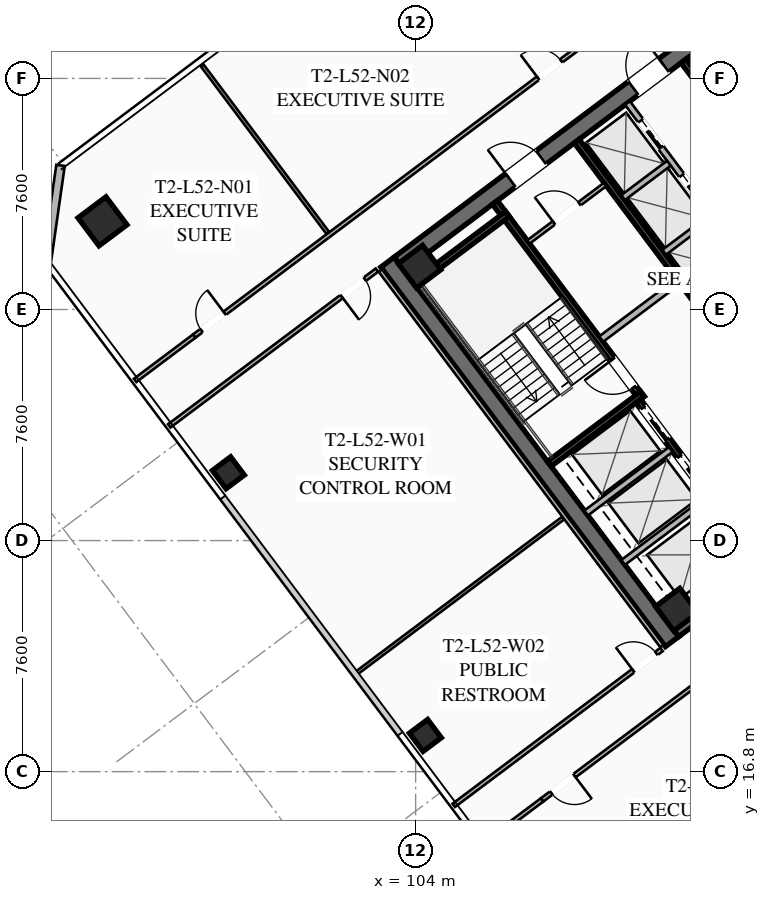
"""IFC4 building model, lengths in metres.
Left out: names, types, materials, properties, quantities, classifications, styles, units other than length and angle.
Written with IfcOpenShell. Run it as: python <this file> out.ifc"""

import sys

from ifc_helpers import new_model, si_unit, direction, frame, frame_2d, origin, origin_2d, place, context, subcontext, project, spatial, rectangle, hollow_rectangle, extrude, element, fill, save


model = new_model("IFC4")
c1 = context("Model", 3, precision=1e-05, world=origin(), true_north=direction((0.0, 1.0)))
c2 = subcontext(c1, "Body", "Model", "MODEL_VIEW")
j1 = project(units=[si_unit("LENGTHUNIT", "METRE"), si_unit("PLANEANGLEUNIT", "RADIAN")], contexts=[c1])
p1 = place(None, origin())
s1 = spatial("IfcSite", under=j1, at=p1, CompositionType="ELEMENT")
p2 = place(p1, origin())
s2 = spatial("IfcBuilding", under=s1, at=p2, CompositionType="ELEMENT")
p3 = place(p2, frame((0.0, 0.0, 192.5)))
s3 = spatial("IfcBuildingStorey", under=s2, at=p3, CompositionType="ELEMENT", Elevation=192.5)
p4 = place(p3, frame((112.436, 21.077, 0.0), z_axis=(0.0, 0.0, 1.0), x_axis=(-0.600005007985, 0.799996243986, 0.0)))
e1 = element("IfcWall", 1, at=p4, inside=s3, PredefinedType="SHEAR", context=c2, shape_type="SweptSolid", body=[
    extrude(rectangle(XDim=15.6, YDim=0.55, at=frame_2d((7.8, 0.0))), origin(), (0.0, 0.0, 1.0), 3.55),
])
p5 = place(p3, frame((124.539, 30.498, 0.0), z_axis=(0.0, 0.0, 1.0), x_axis=(-0.799998054672, -0.600002593761, 0.0)))
e2 = element("IfcWall", 2, at=p5, inside=s3, PredefinedType="SHEAR", context=c2, shape_type="SweptSolid", body=[
    extrude(rectangle(XDim=15.06, YDim=0.55, at=frame_2d((7.53, 0.0))), origin(), (0.0, 0.0, 1.0), 3.55),
])
p6 = place(p5, frame((9.23, 0.0, 0.0)))
e3 = element("IfcOpeningElement", 3, at=p6, cuts=e2, PredefinedType="OPENING", context=c2, shape_type="SweptSolid", body=[
    extrude(rectangle(XDim=1.25, YDim=2.25, at=frame_2d((0.625, 1.125))), frame((0.0, 0.285, 0.0), z_axis=(0.0, -1.0, 0.0), x_axis=(1.0, 0.0, 0.0)), (0.0, 0.0, 1.0), 0.57),
])
p7 = place(p5, frame((4.18, 0.0, 0.0)))
e4 = element("IfcOpeningElement", 4, at=p7, cuts=e2, PredefinedType="OPENING", context=c2, shape_type="SweptSolid", body=[
    extrude(rectangle(XDim=1.25, YDim=2.25, at=frame_2d((0.625, 1.125))), frame((0.0, 0.285, 0.0), z_axis=(0.0, -1.0, 0.0), x_axis=(1.0, 0.0, 0.0)), (0.0, 0.0, 1.0), 0.57),
])
p8 = place(p3, frame((103.461, 33.502, 0.0), z_axis=(0.0, 0.0, 1.0), x_axis=(0.799998054672, 0.600002593761, 0.0)))
e5 = element("IfcWall", 5, at=p8, inside=s3, PredefinedType="SHEAR", context=c2, shape_type="SweptSolid", body=[
    extrude(rectangle(XDim=15.06, YDim=0.55, at=frame_2d((7.53, 0.0))), origin(), (0.0, 0.0, 1.0), 3.55),
])
p9 = place(p8, frame((4.58, 0.0, 0.0)))
e6 = element("IfcOpeningElement", 6, at=p9, cuts=e5, PredefinedType="OPENING", context=c2, shape_type="SweptSolid", body=[
    extrude(rectangle(XDim=1.25, YDim=2.25, at=frame_2d((0.625, 1.125))), frame((0.0, 0.285, 0.0), z_axis=(0.0, -1.0, 0.0), x_axis=(1.0, 0.0, 0.0)), (0.0, 0.0, 1.0), 0.57),
])
p10 = place(p8, frame((9.63, 0.0, 0.0)))
e7 = element("IfcOpeningElement", 7, at=p10, cuts=e5, PredefinedType="OPENING", context=c2, shape_type="SweptSolid", body=[
    extrude(rectangle(XDim=1.25, YDim=2.25, at=frame_2d((0.625, 1.125))), frame((0.0, 0.285, 0.0), z_axis=(0.0, -1.0, 0.0), x_axis=(1.0, 0.0, 0.0)), (0.0, 0.0, 1.0), 0.57),
])
for number, where, z_axis, x_axis in (
    (8, (112.59, 22.13, 0.0), (0.0, 0.0, 1.0), (0.8, 0.6, 0.0)),
    (9, (104.13, 33.41, 0.0), (0.0, 0.0, 1.0), (0.8, 0.6, 0.0)),
):
    element("IfcColumn", number, at=place(p3, frame(where, z_axis=z_axis, x_axis=x_axis)), inside=s3, PredefinedType="COLUMN", context=c2, shape_type="SweptSolid", body=[
        extrude(hollow_rectangle(XDim=1.0, YDim=1.0, WallThickness=0.04, at=origin_2d()), origin(), (0.0, 0.0, 1.0), 3.37),
    ])
p11 = place(p3, frame((93.7, 34.9, 0.0), z_axis=(0.0, 0.0, 1.0), x_axis=(0.799999996291, 0.600000004945, 0.0)))
e10 = element("IfcColumn", 10, at=p11, inside=s3, PredefinedType="COLUMN", context=c2, shape_type="SweptSolid", body=[
    extrude(hollow_rectangle(XDim=1.15, YDim=1.15, WallThickness=0.045, at=origin_2d()), origin(), (0.0, 0.0, 1.0), 3.37),
])
for number, where, z_axis, x_axis in (
    (11, (97.84, 26.63, 0.0), (0.0, 0.0, 1.0), (0.8, 0.6, 0.0)),
    (12, (104.32, 17.99, 0.0), (0.0, 0.0, 1.0), (0.8, 0.6, 0.0)),
):
    element("IfcColumn", number, at=place(p3, frame(where, z_axis=z_axis, x_axis=x_axis)), inside=s3, PredefinedType="COLUMN", context=c2, shape_type="SweptSolid", body=[
        extrude(hollow_rectangle(XDim=0.75, YDim=0.75, WallThickness=0.032, at=origin_2d()), origin(), (0.0, 0.0, 1.0), 3.37),
    ])
p12 = place(p3, frame((91.86, 33.52, 0.0), z_axis=(0.0, 0.0, 1.0), x_axis=(0.141410847992, 0.989950994782, 0.0)))
e13 = element("IfcWall", 13, at=p12, inside=s3, PredefinedType="SOLIDWALL", context=c2, shape_type="SweptSolid", body=[
    extrude(rectangle(XDim=3.253, YDim=0.28, at=frame_2d((1.626, 0.0))), origin(), (0.0, 0.0, 1.0), 3.37),
])
p13 = place(p3, frame((111.44, 29.08, 0.0), z_axis=(0.0, 0.0, 1.0), x_axis=(-0.59999029481, 0.8000072788, 0.0)))
e14 = element("IfcWall", 14, at=p13, inside=s3, PredefinedType="SHEAR", context=c2, shape_type="SweptSolid", body=[
    extrude(rectangle(XDim=8.05, YDim=0.2, at=frame_2d((4.025, 0.0))), origin(), (0.0, 0.0, 1.0), 3.37),
])
p14 = place(p13, frame((0.45, 0.0, 0.0)))
e15 = element("IfcOpeningElement", 15, at=p14, cuts=e14, PredefinedType="OPENING", context=c2, shape_type="SweptSolid", body=[
    extrude(rectangle(XDim=1.15, YDim=2.2, at=frame_2d((0.575, 1.1))), frame((0.0, 0.11, 0.0), z_axis=(0.0, -1.0, 0.0), x_axis=(1.0, 0.0, 0.0)), (0.0, 0.0, 1.0), 0.22),
])
for number, where, z_axis, x_axis in (
    (16, (108.396, 26.922, 0.0), (0.0, 0.0, 1.0), (0.8, 0.6, 0.0)),
    (17, (103.956, 32.842, 0.0), (0.0, 0.0, 1.0), (0.8, 0.6, 0.0)),
):
    element("IfcWall", number, at=place(p3, frame(where, z_axis=z_axis, x_axis=x_axis)), inside=s3, PredefinedType="SHEAR", context=c2, shape_type="SweptSolid", body=[
        extrude(rectangle(XDim=3.83, YDim=0.2, at=frame_2d((1.915, 0.0))), origin(), (0.0, 0.0, 1.0), 3.37),
    ])
p15 = place(p3, frame((117.998, 25.936, 0.0), z_axis=(0.0, 0.0, 1.0), x_axis=(-0.600002693989, 0.799997979501, 0.0)))
e18 = element("IfcWall", 18, at=p15, inside=s3, PredefinedType="SHEAR", context=c2, shape_type="SweptSolid", body=[
    extrude(rectangle(XDim=14.5, YDim=0.2, at=frame_2d((7.25, 0.0))), origin(), (0.0, 0.0, 1.0), 3.37),
])
p16 = place(p3, frame((110.104, 31.028, 0.0), z_axis=(0.0, 0.0, 1.0), x_axis=(0.800018601094, 0.59997519774, 0.0)))
e19 = element("IfcWall", 19, at=p16, inside=s3, PredefinedType="SOLIDWALL", context=c2, shape_type="SweptSolid", body=[
    extrude(rectangle(XDim=3.15, YDim=0.22, at=frame_2d((1.575, 0.0))), origin(), (0.0, 0.0, 1.0), 2.723),
])
p17 = place(p3, frame((115.19, 23.83, 0.0), z_axis=(0.0, 0.0, 1.0), x_axis=(-0.599993943644, 0.800004542231, 0.0)))
e20 = element("IfcWall", 20, at=p17, inside=s3, PredefinedType="SHEAR", context=c2, shape_type="SweptSolid", body=[
    extrude(rectangle(XDim=6.45, YDim=0.2, at=frame_2d((3.225, 0.0))), origin(), (0.0, 0.0, 1.0), 3.37),
])
p18 = place(p17, frame((4.875, 0.0, 0.0)))
e21 = element("IfcOpeningElement", 21, at=p18, cuts=e20, PredefinedType="OPENING", context=c2, shape_type="SweptSolid", body=[
    extrude(rectangle(XDim=1.3, YDim=2.25, at=frame_2d((0.65, 1.125))), frame((0.0, 0.11, 0.0), z_axis=(0.0, -1.0, 0.0), x_axis=(1.0, 0.0, 0.0)), (0.0, 0.0, 1.0), 0.22),
])
p19 = place(p17, frame((2.875, 0.0, 0.0)))
e22 = element("IfcOpeningElement", 22, at=p19, cuts=e20, PredefinedType="OPENING", context=c2, shape_type="SweptSolid", body=[
    extrude(rectangle(XDim=1.3, YDim=2.25, at=frame_2d((0.65, 1.125))), frame((0.0, 0.11, 0.0), z_axis=(0.0, -1.0, 0.0), x_axis=(1.0, 0.0, 0.0)), (0.0, 0.0, 1.0), 0.22),
])
p20 = place(p17, frame((0.675, 0.0, 0.0)))
e23 = element("IfcOpeningElement", 23, at=p20, cuts=e20, PredefinedType="OPENING", context=c2, shape_type="SweptSolid", body=[
    extrude(rectangle(XDim=1.3, YDim=2.25, at=frame_2d((0.65, 1.125))), frame((0.0, 0.11, 0.0), z_axis=(0.0, -1.0, 0.0), x_axis=(1.0, 0.0, 0.0)), (0.0, 0.0, 1.0), 0.22),
])
for number, where, z_axis, x_axis in (
    (24, (110.826, 23.682, 0.0), (0.0, 0.0, 1.0), (0.8, 0.6, 0.0)),
    (25, (109.608, 25.306, 0.0), (0.0, 0.0, 1.0), (0.8, 0.6, 0.0)),
):
    element("IfcWall", number, at=place(p3, frame(where, z_axis=z_axis, x_axis=x_axis)), inside=s3, PredefinedType="SOLIDWALL", context=c2, shape_type="SweptSolid", body=[
        extrude(rectangle(XDim=3.48, YDim=0.2, at=frame_2d((1.74, 0.0))), origin(), (0.0, 0.0, 1.0), 3.37),
    ])
p21 = place(p3, frame((112.81, 40.17, 0.0), z_axis=(0.0, 0.0, 1.0), x_axis=(0.599993943644, -0.800004542231, 0.0)))
e26 = element("IfcWall", 26, at=p21, inside=s3, PredefinedType="SHEAR", context=c2, shape_type="SweptSolid", body=[
    extrude(rectangle(XDim=6.45, YDim=0.2, at=frame_2d((3.225, 0.0))), origin(), (0.0, 0.0, 1.0), 3.37),
])
p22 = place(p3, frame((107.71, 34.22, 0.0), z_axis=(0.0, 0.0, 1.0), x_axis=(0.799981399002, 0.60002480053, 0.0)))
e27 = element("IfcWall", 27, at=p22, inside=s3, PredefinedType="PARTITIONING", context=c2, shape_type="SweptSolid", body=[
    extrude(rectangle(XDim=3.15, YDim=0.135, at=frame_2d((1.575, 0.0))), origin(), (0.0, 0.0, 1.0), 2.723),
])
p23 = place(p22, frame((1.05, 0.0, 0.0)))
e28 = element("IfcOpeningElement", 28, at=p23, cuts=e27, PredefinedType="OPENING", context=c2, shape_type="SweptSolid", body=[
    extrude(rectangle(XDim=1.05, YDim=2.2, at=frame_2d((0.525, 1.1))), frame((0.0, 0.077, 0.0), z_axis=(0.0, -1.0, 0.0), x_axis=(1.0, 0.0, 0.0)), (0.0, 0.0, 1.0), 0.155),
])
p24 = place(p3, frame((115.11, 33.27, 0.0), z_axis=(0.0, 0.0, 1.0), x_axis=(-0.600011322243, 0.799991508192, 0.0)))
e29 = element("IfcWall", 29, at=p24, inside=s3, PredefinedType="SOLIDWALL", context=c2, shape_type="SweptSolid", body=[
    extrude(rectangle(XDim=6.9, YDim=0.2, at=frame_2d((3.45, 0.0))), origin(), (0.0, 0.0, 1.0), 3.37),
])
p25 = place(p24, frame((0.575, 0.0, 0.0)))
e30 = element("IfcOpeningElement", 30, at=p25, cuts=e29, PredefinedType="OPENING", context=c2, shape_type="SweptSolid", body=[
    extrude(rectangle(XDim=1.1, YDim=2.2, at=frame_2d((0.55, 1.1))), frame((0.0, 0.11, 0.0), z_axis=(0.0, -1.0, 0.0), x_axis=(1.0, 0.0, 0.0)), (0.0, 0.0, 1.0), 0.22),
])
p26 = place(p24, frame((2.825, 0.0, 0.0)))
e31 = element("IfcOpeningElement", 31, at=p26, cuts=e29, PredefinedType="OPENING", context=c2, shape_type="SweptSolid", body=[
    extrude(rectangle(XDim=1.1, YDim=2.2, at=frame_2d((0.55, 1.1))), frame((0.0, 0.11, 0.0), z_axis=(0.0, -1.0, 0.0), x_axis=(1.0, 0.0, 0.0)), (0.0, 0.0, 1.0), 0.22),
])
p27 = place(p24, frame((5.075, 0.0, 0.0)))
e32 = element("IfcOpeningElement", 32, at=p27, cuts=e29, PredefinedType="OPENING", context=c2, shape_type="SweptSolid", body=[
    extrude(rectangle(XDim=1.1, YDim=2.2, at=frame_2d((0.55, 1.1))), frame((0.0, 0.11, 0.0), z_axis=(0.0, -1.0, 0.0), x_axis=(1.0, 0.0, 0.0)), (0.0, 0.0, 1.0), 0.22),
])
p28 = place(p3, frame((112.176, 33.882, 0.0), z_axis=(0.0, 0.0, 1.0), x_axis=(0.8, 0.6, 0.0)))
e33 = element("IfcWall", 33, at=p28, inside=s3, PredefinedType="SOLIDWALL", context=c2, shape_type="SweptSolid", body=[
    extrude(rectangle(XDim=1.88, YDim=0.2, at=frame_2d((0.94, 0.0))), origin(), (0.0, 0.0, 1.0), 3.37),
])
p29 = place(p3, frame((110.826, 35.682, 0.0), z_axis=(0.0, 0.0, 1.0), x_axis=(0.799984418148, 0.600020775241, 0.0)))
e34 = element("IfcWall", 34, at=p29, inside=s3, PredefinedType="SOLIDWALL", context=c2, shape_type="SweptSolid", body=[
    extrude(rectangle(XDim=1.88, YDim=0.2, at=frame_2d((0.94, 0.0))), origin(), (0.0, 0.0, 1.0), 3.37),
])
p30 = place(p3, frame((96.718, 31.126, 0.0), z_axis=(0.0, 0.0, 1.0), x_axis=(0.8, 0.6, 0.0)))
e35 = element("IfcWall", 35, at=p30, inside=s3, PredefinedType="PARTITIONING", context=c2, shape_type="SweptSolid", body=[
    extrude(rectangle(XDim=28.7, YDim=0.135, at=frame_2d((14.35, 0.0))), origin(), (0.0, 0.0, 1.0), 2.723),
])
p31 = place(p30, frame((0.3, 0.0, 0.0)))
e36 = element("IfcOpeningElement", 36, at=p31, cuts=e35, PredefinedType="OPENING", context=c2, shape_type="SweptSolid", body=[
    extrude(rectangle(XDim=0.95, YDim=2.05, at=frame_2d((0.475, 1.025))), frame((0.0, 0.077, 0.0), z_axis=(0.0, -1.0, 0.0), x_axis=(1.0, 0.0, 0.0)), (0.0, 0.0, 1.0), 0.155),
])
p32 = place(p30, frame((14.138, 0.0, 0.0)))
e37 = element("IfcOpeningElement", 37, at=p32, cuts=e35, PredefinedType="OPENING", context=c2, shape_type="SweptSolid", body=[
    extrude(rectangle(XDim=0.95, YDim=2.05, at=frame_2d((0.475, 1.025))), frame((0.0, 0.077, 0.0), z_axis=(0.0, -1.0, 0.0), x_axis=(1.0, 0.0, 0.0)), (0.0, 0.0, 1.0), 0.155),
])
p33 = place(p30, frame((27.45, 0.0, 0.0)))
e38 = element("IfcOpeningElement", 38, at=p33, cuts=e35, PredefinedType="OPENING", context=c2, shape_type="SweptSolid", body=[
    extrude(rectangle(XDim=0.95, YDim=2.05, at=frame_2d((0.475, 1.025))), frame((0.0, 0.077, 0.0), z_axis=(0.0, -1.0, 0.0), x_axis=(1.0, 0.0, 0.0)), (0.0, 0.0, 1.0), 0.155),
])
p34 = place(p3, frame((94.774, 29.668, 0.0), z_axis=(0.0, 0.0, 1.0), x_axis=(0.800012055778, 0.599983925293, 0.0)))
e39 = element("IfcWall", 39, at=p34, inside=s3, PredefinedType="PARTITIONING", context=c2, shape_type="SweptSolid", body=[
    extrude(rectangle(XDim=2.43, YDim=0.135, at=frame_2d((1.215, 0.0))), origin(), (0.0, 0.0, 1.0), 2.723),
])
p35 = place(p3, frame((101.11, 34.52, 0.0), z_axis=(0.0, 0.0, 1.0), x_axis=(-0.600022710417, 0.799982966683, 0.0)))
e40 = element("IfcWall", 40, at=p35, inside=s3, PredefinedType="PARTITIONING", context=c2, shape_type="SweptSolid", body=[
    extrude(rectangle(XDim=6.88, YDim=0.11, at=frame_2d((3.44, 0.0))), origin(), (0.0, 0.0, 1.0), 2.723),
])
p36 = place(p3, frame((131.12, 33.09, 0.0), z_axis=(0.0, 0.0, 1.0), x_axis=(-0.800003062365, -0.599995916825, 0.0)))
e41 = element("IfcWall", 41, at=p36, inside=s3, PredefinedType="PARTITIONING", context=c2, shape_type="SweptSolid", body=[
    extrude(rectangle(XDim=28.7, YDim=0.135, at=frame_2d((14.35, 0.0))), origin(), (0.0, 0.0, 1.0), 2.723),
])
p37 = place(p36, frame((27.37, 0.0, 0.0)))
e42 = element("IfcOpeningElement", 42, at=p37, cuts=e41, PredefinedType="OPENING", context=c2, shape_type="SweptSolid", body=[
    extrude(rectangle(XDim=0.95, YDim=2.05, at=frame_2d((0.475, 1.025))), frame((0.0, 0.077, 0.0), z_axis=(0.0, -1.0, 0.0), x_axis=(1.0, 0.0, 0.0)), (0.0, 0.0, 1.0), 0.155),
])
p38 = place(p36, frame((13.638, 0.0, 0.0)))
e43 = element("IfcOpeningElement", 43, at=p38, cuts=e41, PredefinedType="OPENING", context=c2, shape_type="SweptSolid", body=[
    extrude(rectangle(XDim=0.95, YDim=2.05, at=frame_2d((0.475, 1.025))), frame((0.0, 0.077, 0.0), z_axis=(0.0, -1.0, 0.0), x_axis=(1.0, 0.0, 0.0)), (0.0, 0.0, 1.0), 0.155),
])
p39 = place(p36, frame((0.38, 0.0, 0.0)))
e44 = element("IfcOpeningElement", 44, at=p39, cuts=e41, PredefinedType="OPENING", context=c2, shape_type="SweptSolid", body=[
    extrude(rectangle(XDim=0.95, YDim=2.05, at=frame_2d((0.475, 1.025))), frame((0.0, 0.077, 0.0), z_axis=(0.0, -1.0, 0.0), x_axis=(1.0, 0.0, 0.0)), (0.0, 0.0, 1.0), 0.155),
])
p40 = place(p3, frame((106.216, 14.412, 0.0), z_axis=(0.0, 0.0, 1.0), x_axis=(0.799975885537, 0.600032151272, 0.0)))
e45 = element("IfcWall", 45, at=p40, inside=s3, PredefinedType="PARTITIONING", context=c2, shape_type="SweptSolid", body=[
    extrude(rectangle(XDim=2.43, YDim=0.135, at=frame_2d((1.215, 0.0))), origin(), (0.0, 0.0, 1.0), 2.723),
])
p41 = place(p3, frame((112.104, 20.928, 0.0), z_axis=(0.0, 0.0, 1.0), x_axis=(-0.599994940075, 0.800003794918, 0.0)))
e46 = element("IfcWall", 46, at=p41, inside=s3, PredefinedType="PARTITIONING", context=c2, shape_type="SweptSolid", body=[
    extrude(rectangle(XDim=15.44, YDim=0.135, at=frame_2d((7.72, 0.0))), origin(), (0.0, 0.0, 1.0), 2.723),
])
p42 = place(p3, frame((102.728, 33.296, 0.0), z_axis=(0.0, 0.0, 1.0), x_axis=(-0.800013722153, -0.59998170336, 0.0)))
e47 = element("IfcWall", 47, at=p42, inside=s3, PredefinedType="PARTITIONING", context=c2, shape_type="SweptSolid", body=[
    extrude(rectangle(XDim=8.54, YDim=0.135, at=frame_2d((4.27, 0.0))), origin(), (0.0, 0.0, 1.0), 2.723),
])
p43 = place(p42, frame((0.5, 0.0, 0.0)))
e48 = element("IfcOpeningElement", 48, at=p43, cuts=e47, PredefinedType="OPENING", context=c2, shape_type="SweptSolid", body=[
    extrude(rectangle(XDim=0.95, YDim=2.05, at=frame_2d((0.475, 1.025))), frame((0.0, 0.077, 0.0), z_axis=(0.0, -1.0, 0.0), x_axis=(1.0, 0.0, 0.0)), (0.0, 0.0, 1.0), 0.155),
])
p44 = place(p3, frame((105.256, 15.692, 0.0), z_axis=(0.0, 0.0, 1.0), x_axis=(0.799989708052, 0.600013722352, 0.0)))
e49 = element("IfcWall", 49, at=p44, inside=s3, PredefinedType="PARTITIONING", context=c2, shape_type="SweptSolid", body=[
    extrude(rectangle(XDim=8.54, YDim=0.135, at=frame_2d((4.27, 0.0))), origin(), (0.0, 0.0, 1.0), 2.723),
])
p45 = place(p44, frame((7.38, 0.0, 0.0)))
e50 = element("IfcOpeningElement", 50, at=p45, cuts=e49, PredefinedType="OPENING", context=c2, shape_type="SweptSolid", body=[
    extrude(rectangle(XDim=0.95, YDim=2.05, at=frame_2d((0.475, 1.025))), frame((0.0, 0.077, 0.0), z_axis=(0.0, -1.0, 0.0), x_axis=(1.0, 0.0, 0.0)), (0.0, 0.0, 1.0), 0.155),
])
p46 = place(p3, frame((102.016, 20.012, 0.0), z_axis=(0.0, 0.0, 1.0), x_axis=(0.799989708052, 0.600013722352, 0.0)))
e51 = element("IfcWall", 51, at=p46, inside=s3, PredefinedType="PARTITIONING", context=c2, shape_type="SweptSolid", body=[
    extrude(rectangle(XDim=8.54, YDim=0.11, at=frame_2d((4.27, 0.0))), origin(), (0.0, 0.0, 1.0), 2.723),
])
p47 = place(p9, origin())
e52 = element("IfcDoor", 52, at=p47, inside=s3, OperationType="SINGLE_SWING_LEFT", PredefinedType="DOOR", context=c2, shape_type="SweptSolid", body=[
    extrude(rectangle(XDim=1.25, YDim=2.25, at=frame_2d((0.625, 1.125))), frame((0.0, 0.025, 0.0), z_axis=(0.0, -1.0, 0.0), x_axis=(1.0, 0.0, 0.0)), (0.0, 0.0, 1.0), 0.05),
])
fill(e6, e52)
p48 = place(p10, origin())
e53 = element("IfcDoor", 53, at=p48, inside=s3, OperationType="SINGLE_SWING_RIGHT", PredefinedType="DOOR", context=c2, shape_type="SweptSolid", body=[
    extrude(rectangle(XDim=1.25, YDim=2.25, at=frame_2d((0.625, 1.125))), frame((0.0, 0.025, 0.0), z_axis=(0.0, -1.0, 0.0), x_axis=(1.0, 0.0, 0.0)), (0.0, 0.0, 1.0), 0.05),
])
fill(e7, e53)
p49 = place(p14, origin())
e54 = element("IfcDoor", 54, at=p49, inside=s3, OperationType="SINGLE_SWING_RIGHT", PredefinedType="DOOR", context=c2, shape_type="SweptSolid", body=[
    extrude(rectangle(XDim=1.15, YDim=2.2, at=frame_2d((0.575, 1.1))), frame((0.0, 0.025, 0.0), z_axis=(0.0, -1.0, 0.0), x_axis=(1.0, 0.0, 0.0)), (0.0, 0.0, 1.0), 0.05),
])
fill(e15, e54)
p50 = place(p23, origin())
e55 = element("IfcDoor", 55, at=p50, inside=s3, OperationType="SINGLE_SWING_LEFT", PredefinedType="DOOR", context=c2, shape_type="SweptSolid", body=[
    extrude(rectangle(XDim=1.05, YDim=2.2, at=frame_2d((0.525, 1.1))), frame((0.0, 0.025, 0.0), z_axis=(0.0, -1.0, 0.0), x_axis=(1.0, 0.0, 0.0)), (0.0, 0.0, 1.0), 0.05),
])
fill(e28, e55)
p51 = place(p31, origin())
e56 = element("IfcDoor", 56, at=p51, inside=s3, OperationType="SINGLE_SWING_RIGHT", PredefinedType="DOOR", context=c2, shape_type="SweptSolid", body=[
    extrude(rectangle(XDim=0.95, YDim=2.05, at=frame_2d((0.475, 1.025))), frame((0.0, 0.025, 0.0), z_axis=(0.0, -1.0, 0.0), x_axis=(1.0, 0.0, 0.0)), (0.0, 0.0, 1.0), 0.05),
])
fill(e36, e56)
p52 = place(p32, origin())
e57 = element("IfcDoor", 57, at=p52, inside=s3, OperationType="SINGLE_SWING_LEFT", PredefinedType="DOOR", context=c2, shape_type="SweptSolid", body=[
    extrude(rectangle(XDim=0.95, YDim=2.05, at=frame_2d((0.475, 1.025))), frame((0.0, 0.025, 0.0), z_axis=(0.0, -1.0, 0.0), x_axis=(1.0, 0.0, 0.0)), (0.0, 0.0, 1.0), 0.05),
])
fill(e37, e57)
p53 = place(p37, origin())
e58 = element("IfcDoor", 58, at=p53, inside=s3, OperationType="SINGLE_SWING_LEFT", PredefinedType="DOOR", context=c2, shape_type="SweptSolid", body=[
    extrude(rectangle(XDim=0.95, YDim=2.05, at=frame_2d((0.475, 1.025))), frame((0.0, 0.025, 0.0), z_axis=(0.0, -1.0, 0.0), x_axis=(1.0, 0.0, 0.0)), (0.0, 0.0, 1.0), 0.05),
])
fill(e42, e58)
p54 = place(p43, origin())
e59 = element("IfcDoor", 59, at=p54, inside=s3, OperationType="SINGLE_SWING_RIGHT", PredefinedType="DOOR", context=c2, shape_type="SweptSolid", body=[
    extrude(rectangle(XDim=0.95, YDim=2.05, at=frame_2d((0.475, 1.025))), frame((0.0, 0.025, 0.0), z_axis=(0.0, -1.0, 0.0), x_axis=(1.0, 0.0, 0.0)), (0.0, 0.0, 1.0), 0.05),
])
fill(e48, e59)
p55 = place(p45, origin())
e60 = element("IfcDoor", 60, at=p55, inside=s3, OperationType="SINGLE_SWING_LEFT", PredefinedType="DOOR", context=c2, shape_type="SweptSolid", body=[
    extrude(rectangle(XDim=0.95, YDim=2.05, at=frame_2d((0.475, 1.025))), frame((0.0, 0.025, 0.0), z_axis=(0.0, -1.0, 0.0), x_axis=(1.0, 0.0, 0.0)), (0.0, 0.0, 1.0), 0.05),
])
fill(e50, e60)
p56 = place(p18, origin())
e61 = element("IfcDoor", 61, at=p56, inside=s3, OperationType="SLIDING_TO_LEFT", PredefinedType="DOOR", context=c2, shape_type="SweptSolid", body=[
    extrude(rectangle(XDim=1.3, YDim=2.25, at=frame_2d((0.65, 1.125))), frame((0.0, 0.025, 0.0), z_axis=(0.0, -1.0, 0.0), x_axis=(1.0, 0.0, 0.0)), (0.0, 0.0, 1.0), 0.05),
])
fill(e21, e61)
p57 = place(p19, origin())
e62 = element("IfcDoor", 62, at=p57, inside=s3, OperationType="SLIDING_TO_LEFT", PredefinedType="DOOR", context=c2, shape_type="SweptSolid", body=[
    extrude(rectangle(XDim=1.3, YDim=2.25, at=frame_2d((0.65, 1.125))), frame((0.0, 0.025, 0.0), z_axis=(0.0, -1.0, 0.0), x_axis=(1.0, 0.0, 0.0)), (0.0, 0.0, 1.0), 0.05),
])
fill(e22, e62)
p58 = place(p26, origin())
e63 = element("IfcDoor", 63, at=p58, inside=s3, OperationType="SLIDING_TO_LEFT", PredefinedType="DOOR", context=c2, shape_type="SweptSolid", body=[
    extrude(rectangle(XDim=1.1, YDim=2.2, at=frame_2d((0.55, 1.1))), frame((0.0, 0.025, 0.0), z_axis=(0.0, -1.0, 0.0), x_axis=(1.0, 0.0, 0.0)), (0.0, 0.0, 1.0), 0.05),
])
fill(e31, e63)
p59 = place(p27, origin())
e64 = element("IfcDoor", 64, at=p59, inside=s3, OperationType="SLIDING_TO_LEFT", PredefinedType="DOOR", context=c2, shape_type="SweptSolid", body=[
    extrude(rectangle(XDim=1.1, YDim=2.2, at=frame_2d((0.55, 1.1))), frame((0.0, 0.025, 0.0), z_axis=(0.0, -1.0, 0.0), x_axis=(1.0, 0.0, 0.0)), (0.0, 0.0, 1.0), 0.05),
])
fill(e32, e64)
save(model, sys.argv[1])
